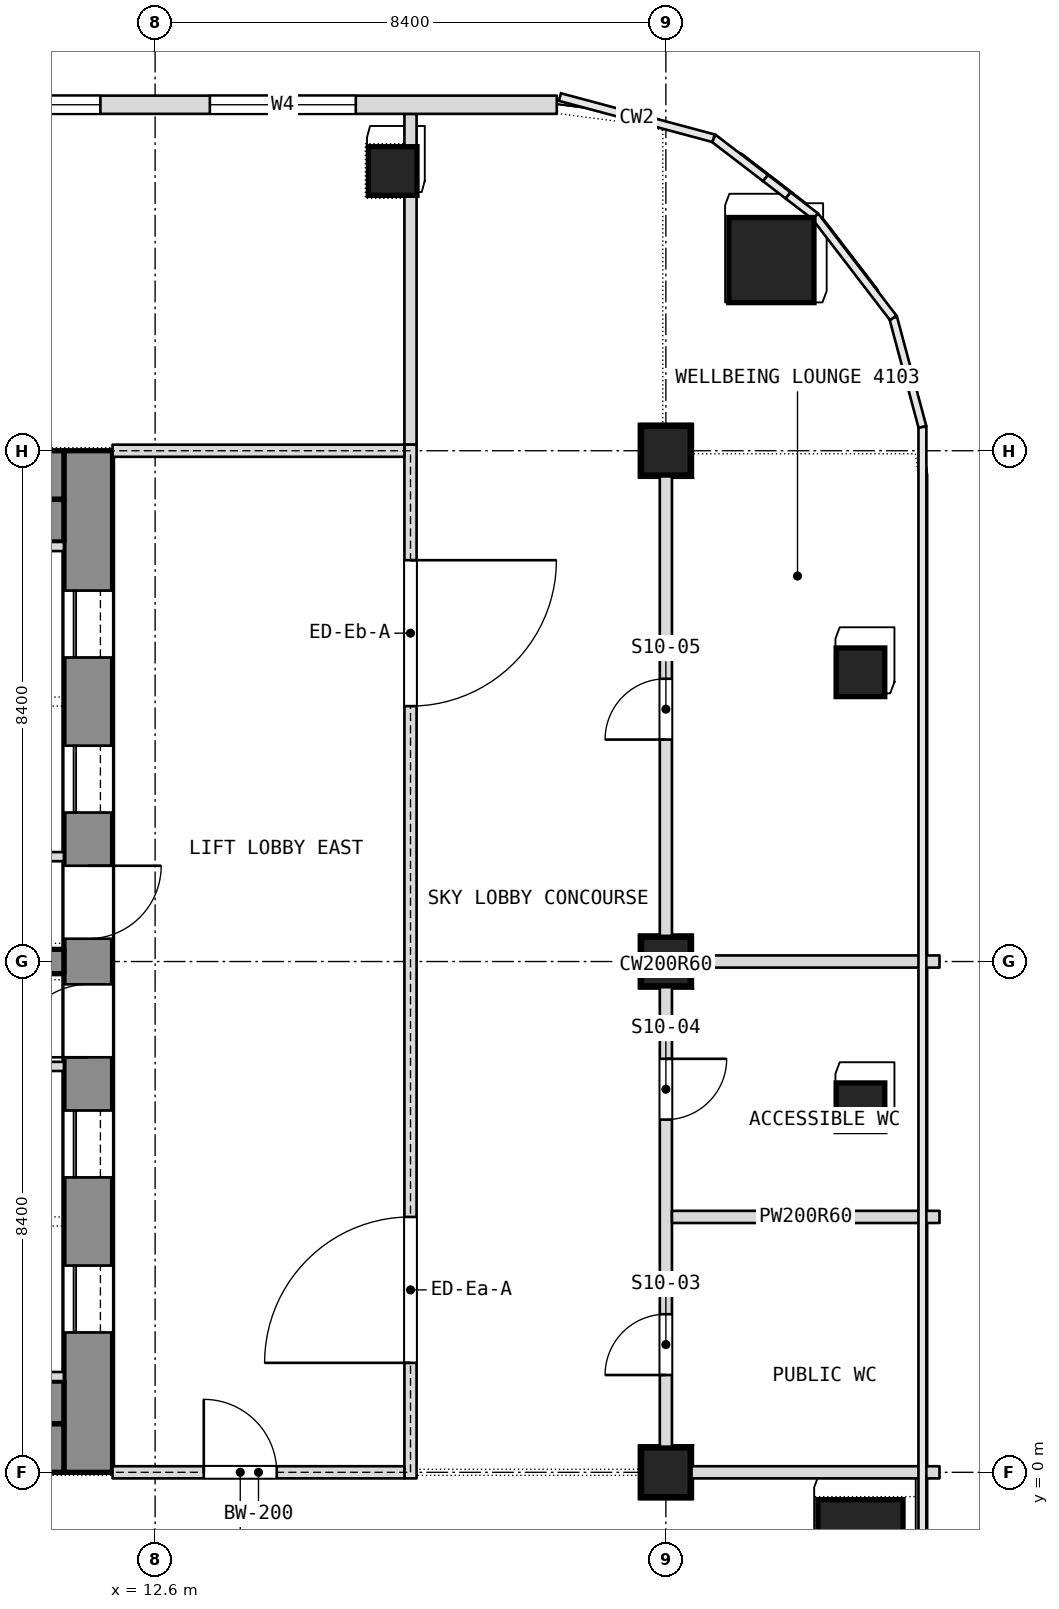
"""IFC4 building model, lengths in metres.
Left out: names, types, materials, properties, quantities, classifications, styles, units other than length and angle.
Written with IfcOpenShell. Run it as: python <this file> out.ifc"""

import sys

from ifc_helpers import new_model, si_unit, direction, frame, frame_2d, origin, origin_2d, place, context, subcontext, project, spatial, rectangle, extrude, element, fill, save


model = new_model("IFC4")
c1 = context("Model", 3, precision=1e-05, world=origin(), true_north=direction((0.0, 1.0)))
c2 = subcontext(c1, "Body", "Model", "MODEL_VIEW")
j1 = project(units=[si_unit("LENGTHUNIT", "METRE"), si_unit("PLANEANGLEUNIT", "RADIAN")], contexts=[c1])
p1 = place(None, origin())
s1 = spatial("IfcSite", under=j1, at=p1, CompositionType="ELEMENT")
p2 = place(p1, origin())
s2 = spatial("IfcBuilding", under=s1, at=p2, CompositionType="ELEMENT")
p3 = place(p2, frame((0.0, 0.0, 180.5)))
s3 = spatial("IfcBuildingStorey", under=s2, at=p3, CompositionType="ELEMENT", Elevation=180.5)
p4 = place(p3, frame((11.5, 0.0, 0.0), z_axis=(0.0, 0.0, 1.0), x_axis=(0.0, 1.0, 0.0)))
e1 = element("IfcWall", 1, at=p4, inside=s3, PredefinedType="SHEAR", context=c2, shape_type="SweptSolid", body=[
    extrude(rectangle(XDim=16.8, YDim=0.8, at=frame_2d((8.4, 0.0))), origin(), (0.0, 0.0, 1.0), 7.2),
])
p5 = place(p4, frame((2.3, 0.0, 0.0)))
e2 = element("IfcOpeningElement", 2, at=p5, cuts=e1, PredefinedType="OPENING", context=c2, shape_type="SweptSolid", body=[
    extrude(rectangle(XDim=1.1, YDim=2.1, at=frame_2d((0.55, 1.05))), frame((0.0, 0.4, 0.0), z_axis=(0.0, -1.0, 0.0), x_axis=(1.0, 0.0, 0.0)), (0.0, 0.0, 1.0), 0.8),
])
p6 = place(p4, frame((4.85, 0.0, 0.0)))
e3 = element("IfcOpeningElement", 3, at=p6, cuts=e1, PredefinedType="OPENING", context=c2, shape_type="SweptSolid", body=[
    extrude(rectangle(XDim=1.1, YDim=2.1, at=frame_2d((0.55, 1.05))), frame((0.0, 0.4, 0.0), z_axis=(0.0, -1.0, 0.0), x_axis=(1.0, 0.0, 0.0)), (0.0, 0.0, 1.0), 0.8),
])
p7 = place(p4, frame((6.825, 0.0, 0.0)))
e4 = element("IfcOpeningElement", 4, at=p7, cuts=e1, PredefinedType="OPENING", context=c2, shape_type="SweptSolid", body=[
    extrude(rectangle(XDim=1.2, YDim=2.1, at=frame_2d((0.6, 1.05))), frame((0.0, 0.4, 0.0), z_axis=(0.0, -1.0, 0.0), x_axis=(1.0, 0.0, 0.0)), (0.0, 0.0, 1.0), 0.8),
])
p8 = place(p4, frame((13.4, 0.0, 0.0)))
e5 = element("IfcOpeningElement", 5, at=p8, cuts=e1, PredefinedType="OPENING", context=c2, shape_type="SweptSolid", body=[
    extrude(rectangle(XDim=1.1, YDim=2.1, at=frame_2d((0.55, 1.05))), frame((0.0, 0.4, 0.0), z_axis=(0.0, -1.0, 0.0), x_axis=(1.0, 0.0, 0.0)), (0.0, 0.0, 1.0), 0.8),
])
p9 = place(p4, frame((10.85, 0.0, 0.0)))
e6 = element("IfcOpeningElement", 6, at=p9, cuts=e1, PredefinedType="OPENING", context=c2, shape_type="SweptSolid", body=[
    extrude(rectangle(XDim=1.1, YDim=2.1, at=frame_2d((0.55, 1.05))), frame((0.0, 0.4, 0.0), z_axis=(0.0, -1.0, 0.0), x_axis=(1.0, 0.0, 0.0)), (0.0, 0.0, 1.0), 0.8),
])
p10 = place(p4, frame((8.775, 0.0, 0.0)))
e7 = element("IfcOpeningElement", 7, at=p10, cuts=e1, PredefinedType="OPENING", context=c2, shape_type="SweptSolid", body=[
    extrude(rectangle(XDim=1.2, YDim=2.1, at=frame_2d((0.6, 1.05))), frame((0.0, 0.4, 0.0), z_axis=(0.0, -1.0, 0.0), x_axis=(1.0, 0.0, 0.0)), (0.0, 0.0, 1.0), 0.8),
])
for number, where, z_axis, x_axis in (
    (8, (-11.1, 0.4, 0.0), (0.0, 0.0, 1.0), (1.0, 0.0, 0.0)),
    (9, (-11.1, 16.4, 0.0), (0.0, 0.0, 1.0), (1.0, 0.0, 0.0)),
):
    element("IfcWall", number, at=place(p3, frame(where, z_axis=z_axis, x_axis=x_axis)), inside=s3, PredefinedType="SHEAR", context=c2, shape_type="SweptSolid", body=[
        extrude(rectangle(XDim=22.2, YDim=0.8, at=frame_2d((11.1, 0.0))), origin(), (0.0, 0.0, 1.0), 7.2),
    ])
p11 = place(p3, frame((4.4, 8.4, 0.0), z_axis=(0.0, 0.0, 1.0), x_axis=(1.0, 0.0, 0.0)))
e10 = element("IfcWall", 10, at=p11, inside=s3, PredefinedType="SHEAR", context=c2, shape_type="SweptSolid", body=[
    extrude(rectangle(XDim=6.7, YDim=0.4, at=frame_2d((3.35, 0.0))), origin(), (0.0, 0.0, 1.0), 7.2),
])
for number, where, z_axis, x_axis in (
    (11, (24.2, -1.15, 0.0), (0.0, 0.0, 1.0), (1.0, 0.0, 0.0)),
    (12, (22.736, 19.936, 0.0), (0.0, 0.0, 1.0), (1.0, 0.0, 0.0)),
):
    element("IfcColumn", number, at=place(p3, frame(where, z_axis=z_axis, x_axis=x_axis)), inside=s3, PredefinedType="COLUMN", context=c2, shape_type="SweptSolid", body=[
        extrude(rectangle(XDim=1.4, YDim=1.4, at=origin_2d()), origin(), (0.0, 0.0, 1.0), 7.2),
    ])
for number, where, z_axis, x_axis in (
    (13, (21.0, 0.0, 0.0), (0.0, 0.0, 1.0), (1.0, 0.0, 0.0)),
    (14, (21.0, 8.4, 0.0), (0.0, 0.0, 1.0), (1.0, 0.0, 0.0)),
    (15, (21.0, 16.8, 0.0), (0.0, 0.0, 1.0), (1.0, 0.0, 0.0)),
    (16, (16.507, 21.4, 0.0), (0.0, 0.0, 1.0), (1.0, 0.0, 0.0)),
    (17, (24.2, 13.156, 0.0), (0.0, 0.0, 1.0), (1.0, 0.0, 0.0)),
    (18, (24.2, 6.003, 0.0), (0.0, 0.0, 1.0), (1.0, 0.0, 0.0)),
):
    element("IfcColumn", number, at=place(p3, frame(where, z_axis=z_axis, x_axis=x_axis)), inside=s3, PredefinedType="COLUMN", context=c2, shape_type="SweptSolid", body=[
        extrude(rectangle(XDim=0.8, YDim=0.8, at=origin_2d()), origin(), (0.0, 0.0, 1.0), 7.2),
    ])
p12 = place(p3, frame((21.0, -0.1, 0.0), z_axis=(0.0, 0.0, 1.0), x_axis=(0.0, 1.0, 0.0)))
e19 = element("IfcWall", 19, at=p12, inside=s3, PredefinedType="PARTITIONING", context=c2, shape_type="SweptSolid", body=[
    extrude(rectangle(XDim=16.9, YDim=0.2, at=frame_2d((8.45, 0.0))), origin(), (0.0, 0.0, 1.0), 6.94),
])
p13 = place(p12, frame((1.7, 0.0, 0.0)))
e20 = element("IfcOpeningElement", 20, at=p13, cuts=e19, PredefinedType="OPENING", context=c2, shape_type="SweptSolid", body=[
    extrude(rectangle(XDim=1.0, YDim=2.1, at=frame_2d((0.5, 1.05))), frame((0.0, 0.1, 0.0), z_axis=(0.0, -1.0, 0.0), x_axis=(1.0, 0.0, 0.0)), (0.0, 0.0, 1.0), 0.2),
])
p14 = place(p12, frame((5.9, 0.0, 0.0)))
e21 = element("IfcOpeningElement", 21, at=p14, cuts=e19, PredefinedType="OPENING", context=c2, shape_type="SweptSolid", body=[
    extrude(rectangle(XDim=1.0, YDim=2.1, at=frame_2d((0.5, 1.05))), frame((0.0, 0.1, 0.0), z_axis=(0.0, -1.0, 0.0), x_axis=(1.0, 0.0, 0.0)), (0.0, 0.0, 1.0), 0.2),
])
p15 = place(p12, frame((12.15, 0.0, 0.0)))
e22 = element("IfcOpeningElement", 22, at=p15, cuts=e19, PredefinedType="OPENING", context=c2, shape_type="SweptSolid", body=[
    extrude(rectangle(XDim=1.0, YDim=2.1, at=frame_2d((0.5, 1.05))), frame((0.0, 0.1, 0.0), z_axis=(0.0, -1.0, 0.0), x_axis=(1.0, 0.0, 0.0)), (0.0, 0.0, 1.0), 0.2),
])
p16 = place(p3, frame((16.8, 16.9, 0.0), z_axis=(0.0, 0.0, 1.0), x_axis=(0.0, 1.0, 0.0)))
e23 = element("IfcWall", 23, at=p16, inside=s3, PredefinedType="PARTITIONING", context=c2, shape_type="SweptSolid", body=[
    extrude(rectangle(XDim=4.1, YDim=0.2, at=frame_2d((2.05, 0.0))), origin(), (0.0, 0.0, 1.0), 6.94),
])
p17 = place(p3, frame((16.8, 21.8, 0.0), z_axis=(0.0, 0.0, 1.0), x_axis=(0.0, 1.0, 0.0)))
e24 = element("IfcWall", 24, at=p17, inside=s3, PredefinedType="PARTITIONING", context=c2, shape_type="SweptSolid", body=[
    extrude(rectangle(XDim=0.54, YDim=0.2, at=frame_2d((0.27, 0.0))), origin(), (0.0, 0.0, 1.0), 6.94),
])
p18 = place(p3, frame((21.1, 0.0, 0.0), z_axis=(0.0, 0.0, 1.0), x_axis=(1.0, 0.0, 0.0)))
e25 = element("IfcWall", 25, at=p18, inside=s3, PredefinedType="PARTITIONING", context=c2, shape_type="SweptSolid", body=[
    extrude(rectangle(XDim=4.4, YDim=0.2, at=frame_2d((2.2, 0.0))), origin(), (0.0, 0.0, 1.0), 6.54),
])
p19 = place(p3, frame((21.1, 4.2, 0.0), z_axis=(0.0, 0.0, 1.0), x_axis=(1.0, 0.0, 0.0)))
e26 = element("IfcWall", 26, at=p19, inside=s3, PredefinedType="PARTITIONING", context=c2, shape_type="SweptSolid", body=[
    extrude(rectangle(XDim=4.4, YDim=0.2, at=frame_2d((2.2, 0.0))), origin(), (0.0, 0.0, 1.0), 6.94),
])
p20 = place(p3, frame((21.1, 8.4, 0.0), z_axis=(0.0, 0.0, 1.0), x_axis=(1.0, 0.0, 0.0)))
e27 = element("IfcWall", 27, at=p20, inside=s3, PredefinedType="PARTITIONING", context=c2, shape_type="SweptSolid", body=[
    extrude(rectangle(XDim=4.4, YDim=0.2, at=frame_2d((2.2, 0.0))), origin(), (0.0, 0.0, 1.0), 6.54),
])
p21 = place(p3, frame((19.206, 22.49, 0.0), z_axis=(0.0, 0.0, 1.0), x_axis=(-1.0, 0.0, 0.0)))
e28 = element("IfcWall", 28, at=p21, inside=s3, PredefinedType="NOTDEFINED", context=c2, shape_type="SweptSolid", body=[
    extrude(rectangle(XDim=38.412, YDim=0.3, at=frame_2d((19.206, 0.0))), origin(), (0.0, 0.0, 1.0), 7.2),
])
p22 = place(p21, frame((3.306, 0.0, 0.9)))
e29 = element("IfcOpeningElement", 29, at=p22, cuts=e28, PredefinedType="OPENING", context=c2, shape_type="SweptSolid", body=[
    extrude(rectangle(XDim=2.4, YDim=4.5, at=frame_2d((1.2, 2.25))), frame((0.0, 0.15, 0.0), z_axis=(0.0, -1.0, 0.0), x_axis=(1.0, 0.0, 0.0)), (0.0, 0.0, 1.0), 0.3),
])
p23 = place(p21, frame((7.506, 0.0, 0.9)))
e30 = element("IfcOpeningElement", 30, at=p23, cuts=e28, PredefinedType="OPENING", context=c2, shape_type="SweptSolid", body=[
    extrude(rectangle(XDim=2.4, YDim=4.5, at=frame_2d((1.2, 2.25))), frame((0.0, 0.15, 0.0), z_axis=(0.0, -1.0, 0.0), x_axis=(1.0, 0.0, 0.0)), (0.0, 0.0, 1.0), 0.3),
])
p24 = place(p21, frame((11.706, 0.0, 0.9)))
e31 = element("IfcOpeningElement", 31, at=p24, cuts=e28, PredefinedType="OPENING", context=c2, shape_type="SweptSolid", body=[
    extrude(rectangle(XDim=2.4, YDim=4.5, at=frame_2d((1.2, 2.25))), frame((0.0, 0.15, 0.0), z_axis=(0.0, -1.0, 0.0), x_axis=(1.0, 0.0, 0.0)), (0.0, 0.0, 1.0), 0.3),
])
p25 = place(p21, frame((15.906, 0.0, 0.9)))
e32 = element("IfcOpeningElement", 32, at=p25, cuts=e28, PredefinedType="OPENING", context=c2, shape_type="SweptSolid", body=[
    extrude(rectangle(XDim=2.4, YDim=4.5, at=frame_2d((1.2, 2.25))), frame((0.0, 0.15, 0.0), z_axis=(0.0, -1.0, 0.0), x_axis=(1.0, 0.0, 0.0)), (0.0, 0.0, 1.0), 0.3),
])
p26 = place(p21, frame((20.106, 0.0, 0.9)))
e33 = element("IfcOpeningElement", 33, at=p26, cuts=e28, PredefinedType="OPENING", context=c2, shape_type="SweptSolid", body=[
    extrude(rectangle(XDim=2.4, YDim=4.5, at=frame_2d((1.2, 2.25))), frame((0.0, 0.15, 0.0), z_axis=(0.0, -1.0, 0.0), x_axis=(1.0, 0.0, 0.0)), (0.0, 0.0, 1.0), 0.3),
])
p27 = place(p21, frame((24.306, 0.0, 0.9)))
e34 = element("IfcOpeningElement", 34, at=p27, cuts=e28, PredefinedType="OPENING", context=c2, shape_type="SweptSolid", body=[
    extrude(rectangle(XDim=2.4, YDim=4.5, at=frame_2d((1.2, 2.25))), frame((0.0, 0.15, 0.0), z_axis=(0.0, -1.0, 0.0), x_axis=(1.0, 0.0, 0.0)), (0.0, 0.0, 1.0), 0.3),
])
p28 = place(p21, frame((28.506, 0.0, 0.9)))
e35 = element("IfcOpeningElement", 35, at=p28, cuts=e28, PredefinedType="OPENING", context=c2, shape_type="SweptSolid", body=[
    extrude(rectangle(XDim=2.4, YDim=4.5, at=frame_2d((1.2, 2.25))), frame((0.0, 0.15, 0.0), z_axis=(0.0, -1.0, 0.0), x_axis=(1.0, 0.0, 0.0)), (0.0, 0.0, 1.0), 0.3),
])
p29 = place(p21, frame((32.706, 0.0, 0.9)))
e36 = element("IfcOpeningElement", 36, at=p29, cuts=e28, PredefinedType="OPENING", context=c2, shape_type="SweptSolid", body=[
    extrude(rectangle(XDim=2.4, YDim=4.5, at=frame_2d((1.2, 2.25))), frame((0.0, 0.15, 0.0), z_axis=(0.0, -1.0, 0.0), x_axis=(1.0, 0.0, 0.0)), (0.0, 0.0, 1.0), 0.3),
])
for number, where, z_axis, x_axis in (
    (37, (-11.1, 1.15, 0.0), (0.0, 0.0, 1.0), (1.0, 0.0, 0.0)),
    (38, (-11.1, 15.65, 0.0), (0.0, 0.0, 1.0), (1.0, 0.0, 0.0)),
):
    element("IfcWall", number, at=place(p3, frame(where, z_axis=z_axis, x_axis=x_axis)), inside=s3, PredefinedType="PARTITIONING", context=c2, shape_type="SweptSolid", body=[
        extrude(rectangle(XDim=22.2, YDim=0.7, at=frame_2d((11.1, 0.0))), origin(), (0.0, 0.0, 1.0), 6.94),
    ])
for number, where, z_axis, x_axis in (
    (39, (9.0, 6.675, 0.0), (0.0, 0.0, 1.0), (1.0, 0.0, 0.0)),
    (40, (9.0, 1.575, 0.0), (0.0, 0.0, 1.0), (1.0, 0.0, 0.0)),
    (41, (9.0, 10.125, 0.0), (0.0, 0.0, 1.0), (1.0, 0.0, 0.0)),
    (42, (9.0, 15.225, 0.0), (0.0, 0.0, 1.0), (1.0, 0.0, 0.0)),
):
    element("IfcWall", number, at=place(p3, frame(where, z_axis=z_axis, x_axis=x_axis)), inside=s3, PredefinedType="SHEAR", context=c2, shape_type="SweptSolid", body=[
        extrude(rectangle(XDim=2.1, YDim=0.15, at=frame_2d((1.05, 0.0))), origin(), (0.0, 0.0, 1.0), 7.2),
    ])
p30 = place(p3, frame((16.8, -0.1, 0.0), z_axis=(0.0, 0.0, 1.0), x_axis=(0.0, 1.0, 0.0)))
e43 = element("IfcWall", 43, at=p30, inside=s3, PredefinedType="PARTITIONING", context=c2, shape_type="SweptSolid", body=[
    extrude(rectangle(XDim=17.0, YDim=0.2, at=frame_2d((8.5, 0.0))), origin(), (0.0, 0.0, 1.0), 6.94),
])
p31 = place(p30, frame((1.9, 0.0, 0.0)))
e44 = element("IfcOpeningElement", 44, at=p31, cuts=e43, PredefinedType="OPENING", context=c2, shape_type="SweptSolid", body=[
    extrude(rectangle(XDim=2.4, YDim=2.1, at=frame_2d((1.2, 1.05))), frame((0.0, 0.1, 0.0), z_axis=(0.0, -1.0, 0.0), x_axis=(1.0, 0.0, 0.0)), (0.0, 0.0, 1.0), 0.2),
])
p32 = place(p30, frame((12.7, 0.0, 0.0)))
e45 = element("IfcOpeningElement", 45, at=p32, cuts=e43, PredefinedType="OPENING", context=c2, shape_type="SweptSolid", body=[
    extrude(rectangle(XDim=2.4, YDim=2.1, at=frame_2d((1.2, 1.05))), frame((0.0, 0.1, 0.0), z_axis=(0.0, -1.0, 0.0), x_axis=(1.0, 0.0, 0.0)), (0.0, 0.0, 1.0), 0.2),
])
p33 = place(p3, frame((11.9, 0.0, 0.0), z_axis=(0.0, 0.0, 1.0), x_axis=(1.0, 0.0, 0.0)))
e46 = element("IfcWall", 46, at=p33, inside=s3, PredefinedType="PARTITIONING", context=c2, shape_type="SweptSolid", body=[
    extrude(rectangle(XDim=4.8, YDim=0.2, at=frame_2d((2.4, 0.0))), origin(), (0.0, 0.0, 1.0), 6.54),
])
p34 = place(p33, frame((1.5, 0.0, 0.0)))
e47 = element("IfcOpeningElement", 47, at=p34, cuts=e46, PredefinedType="OPENING", context=c2, shape_type="SweptSolid", body=[
    extrude(rectangle(XDim=1.2, YDim=2.1, at=frame_2d((0.6, 1.05))), frame((0.0, 0.1, 0.0), z_axis=(0.0, -1.0, 0.0), x_axis=(1.0, 0.0, 0.0)), (0.0, 0.0, 1.0), 0.2),
])
p35 = place(p3, frame((11.9, 16.8, 0.0), z_axis=(0.0, 0.0, 1.0), x_axis=(1.0, 0.0, 0.0)))
e48 = element("IfcWall", 48, at=p35, inside=s3, PredefinedType="PARTITIONING", context=c2, shape_type="SweptSolid", body=[
    extrude(rectangle(XDim=4.8, YDim=0.2, at=frame_2d((2.4, 0.0))), origin(), (0.0, 0.0, 1.0), 6.54),
])
p36 = place(p13, origin())
e49 = element("IfcDoor", 49, at=p36, inside=s3, OperationType="SINGLE_SWING_RIGHT", PredefinedType="DOOR", context=c2, shape_type="SweptSolid", body=[
    extrude(rectangle(XDim=1.0, YDim=2.1, at=frame_2d((0.5, 1.05))), frame((0.0, 0.025, 0.0), z_axis=(0.0, -1.0, 0.0), x_axis=(1.0, 0.0, 0.0)), (0.0, 0.0, 1.0), 0.05),
])
fill(e20, e49)
p37 = place(p14, origin())
e50 = element("IfcDoor", 50, at=p37, inside=s3, OperationType="SINGLE_SWING_LEFT", PredefinedType="DOOR", context=c2, shape_type="SweptSolid", body=[
    extrude(rectangle(XDim=1.0, YDim=2.1, at=frame_2d((0.5, 1.05))), frame((0.0, 0.025, 0.0), z_axis=(0.0, -1.0, 0.0), x_axis=(1.0, 0.0, 0.0)), (0.0, 0.0, 1.0), 0.05),
])
fill(e21, e50)
p38 = place(p15, origin())
e51 = element("IfcDoor", 51, at=p38, inside=s3, OperationType="SINGLE_SWING_RIGHT", PredefinedType="DOOR", context=c2, shape_type="SweptSolid", body=[
    extrude(rectangle(XDim=1.0, YDim=2.1, at=frame_2d((0.5, 1.05))), frame((0.0, 0.025, 0.0), z_axis=(0.0, -1.0, 0.0), x_axis=(1.0, 0.0, 0.0)), (0.0, 0.0, 1.0), 0.05),
])
fill(e22, e51)
p39 = place(p22, origin())
e52 = element("IfcWindow", 52, at=p39, inside=s3, PartitioningType="SINGLE_PANEL", PredefinedType="WINDOW", context=c2, shape_type="SweptSolid", body=[
    extrude(rectangle(XDim=2.4, YDim=4.5, at=frame_2d((1.2, 2.25))), frame((0.0, 0.03, 0.0), z_axis=(0.0, -1.0, 0.0), x_axis=(1.0, 0.0, 0.0)), (0.0, 0.0, 1.0), 0.06),
])
fill(e29, e52)
p40 = place(p23, origin())
e53 = element("IfcWindow", 53, at=p40, inside=s3, PartitioningType="SINGLE_PANEL", PredefinedType="WINDOW", context=c2, shape_type="SweptSolid", body=[
    extrude(rectangle(XDim=2.4, YDim=4.5, at=frame_2d((1.2, 2.25))), frame((0.0, 0.03, 0.0), z_axis=(0.0, -1.0, 0.0), x_axis=(1.0, 0.0, 0.0)), (0.0, 0.0, 1.0), 0.06),
])
fill(e30, e53)
p41 = place(p5, origin())
e54 = element("IfcDoor", 54, at=p41, inside=s3, OperationType="SLIDING_TO_LEFT", PredefinedType="DOOR", context=c2, shape_type="SweptSolid", body=[
    extrude(rectangle(XDim=1.1, YDim=2.1, at=frame_2d((0.55, 1.05))), frame((0.0, 0.025, 0.0), z_axis=(0.0, -1.0, 0.0), x_axis=(1.0, 0.0, 0.0)), (0.0, 0.0, 1.0), 0.05),
])
fill(e2, e54)
p42 = place(p6, origin())
e55 = element("IfcDoor", 55, at=p42, inside=s3, OperationType="SLIDING_TO_LEFT", PredefinedType="DOOR", context=c2, shape_type="SweptSolid", body=[
    extrude(rectangle(XDim=1.1, YDim=2.1, at=frame_2d((0.55, 1.05))), frame((0.0, 0.025, 0.0), z_axis=(0.0, -1.0, 0.0), x_axis=(1.0, 0.0, 0.0)), (0.0, 0.0, 1.0), 0.05),
])
fill(e3, e55)
p43 = place(p7, origin())
e56 = element("IfcDoor", 56, at=p43, inside=s3, OperationType="SINGLE_SWING_LEFT", PredefinedType="DOOR", context=c2, shape_type="SweptSolid", body=[
    extrude(rectangle(XDim=1.2, YDim=2.1, at=frame_2d((0.6, 1.05))), frame((0.0, 0.025, 0.0), z_axis=(0.0, -1.0, 0.0), x_axis=(1.0, 0.0, 0.0)), (0.0, 0.0, 1.0), 0.05),
])
fill(e4, e56)
p44 = place(p8, origin())
e57 = element("IfcDoor", 57, at=p44, inside=s3, OperationType="SLIDING_TO_LEFT", PredefinedType="DOOR", context=c2, shape_type="SweptSolid", body=[
    extrude(rectangle(XDim=1.1, YDim=2.1, at=frame_2d((0.55, 1.05))), frame((0.0, 0.025, 0.0), z_axis=(0.0, -1.0, 0.0), x_axis=(1.0, 0.0, 0.0)), (0.0, 0.0, 1.0), 0.05),
])
fill(e5, e57)
p45 = place(p9, origin())
e58 = element("IfcDoor", 58, at=p45, inside=s3, OperationType="SLIDING_TO_LEFT", PredefinedType="DOOR", context=c2, shape_type="SweptSolid", body=[
    extrude(rectangle(XDim=1.1, YDim=2.1, at=frame_2d((0.55, 1.05))), frame((0.0, 0.025, 0.0), z_axis=(0.0, -1.0, 0.0), x_axis=(1.0, 0.0, 0.0)), (0.0, 0.0, 1.0), 0.05),
])
fill(e6, e58)
p46 = place(p10, origin())
e59 = element("IfcDoor", 59, at=p46, inside=s3, OperationType="SINGLE_SWING_LEFT", PredefinedType="DOOR", context=c2, shape_type="SweptSolid", body=[
    extrude(rectangle(XDim=1.2, YDim=2.1, at=frame_2d((0.6, 1.05))), frame((0.0, 0.025, 0.0), z_axis=(0.0, -1.0, 0.0), x_axis=(1.0, 0.0, 0.0)), (0.0, 0.0, 1.0), 0.05),
])
fill(e7, e59)
p47 = place(p31, origin())
e60 = element("IfcDoor", 60, at=p47, inside=s3, OperationType="DOUBLE_DOOR_SINGLE_SWING", PredefinedType="DOOR", context=c2, shape_type="SweptSolid", body=[
    extrude(rectangle(XDim=2.4, YDim=2.1, at=frame_2d((1.2, 1.05))), frame((0.0, 0.025, 0.0), z_axis=(0.0, -1.0, 0.0), x_axis=(1.0, 0.0, 0.0)), (0.0, 0.0, 1.0), 0.05),
])
fill(e44, e60)
p48 = place(p32, origin())
e61 = element("IfcDoor", 61, at=p48, inside=s3, OperationType="DOUBLE_DOOR_SINGLE_SWING", PredefinedType="DOOR", context=c2, shape_type="SweptSolid", body=[
    extrude(rectangle(XDim=2.4, YDim=2.1, at=frame_2d((1.2, 1.05))), frame((0.0, 0.025, 0.0), z_axis=(0.0, -1.0, 0.0), x_axis=(1.0, 0.0, 0.0)), (0.0, 0.0, 1.0), 0.05),
])
fill(e45, e61)
p49 = place(p34, origin())
e62 = element("IfcDoor", 62, at=p49, inside=s3, OperationType="SINGLE_SWING_LEFT", PredefinedType="DOOR", context=c2, shape_type="SweptSolid", body=[
    extrude(rectangle(XDim=1.2, YDim=2.1, at=frame_2d((0.6, 1.05))), frame((0.0, 0.025, 0.0), z_axis=(0.0, -1.0, 0.0), x_axis=(1.0, 0.0, 0.0)), (0.0, 0.0, 1.0), 0.05),
])
fill(e47, e62)
save(model, sys.argv[1])
